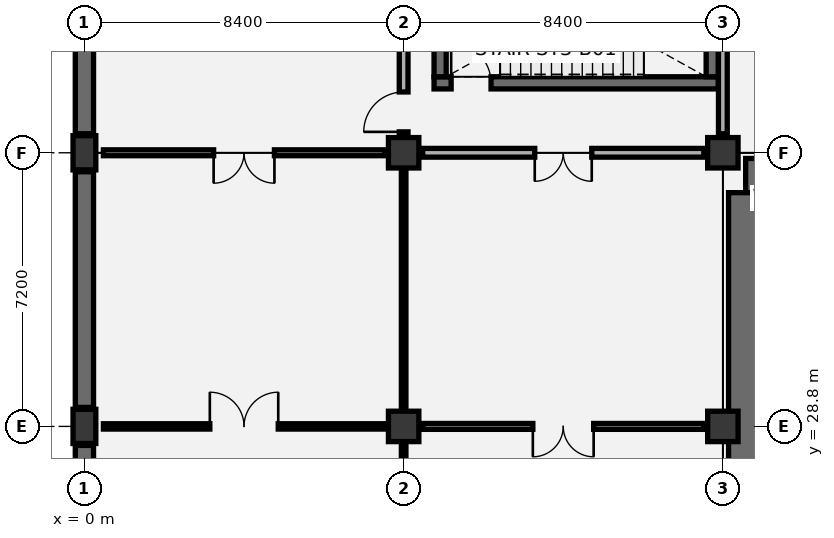
"""IFC4 building model, lengths in metres.
Left out: names, types, materials, properties, quantities, classifications, styles, units other than length and angle.
Written with IfcOpenShell. Run it as: python <this file> out.ifc"""

import sys

from ifc_helpers import new_model, si_unit, direction, frame, frame_2d, origin, origin_2d, place, context, subcontext, project, spatial, rectangle, extrude, element, fill, save


model = new_model("IFC4")
c1 = context("Model", 3, precision=1e-05, world=origin(), true_north=direction((0.0, 1.0)))
c2 = subcontext(c1, "Body", "Model", "MODEL_VIEW")
j1 = project(units=[si_unit("LENGTHUNIT", "METRE"), si_unit("PLANEANGLEUNIT", "RADIAN")], contexts=[c1])
p1 = place(None, origin())
s1 = spatial("IfcSite", under=j1, at=p1, CompositionType="ELEMENT")
p2 = place(p1, origin())
s2 = spatial("IfcBuilding", under=s1, at=p2, CompositionType="ELEMENT")
p3 = place(p2, frame((0.0, 0.0, -4.8)))
s3 = spatial("IfcBuildingStorey", under=s2, at=p3, CompositionType="ELEMENT", Elevation=-4.8)
for number, where, z_axis, x_axis in (
    (1, (0.0, 28.8, 0.0), (0.0, 0.0, 1.0), (1.0, 0.0, 0.0)),
    (2, (0.0, 36.0, 0.0), (0.0, 0.0, 1.0), (1.0, 0.0, 0.0)),
):
    element("IfcColumn", number, at=place(p3, frame(where, z_axis=z_axis, x_axis=x_axis)), inside=s3, PredefinedType="COLUMN", context=c2, shape_type="SweptSolid", body=[
        extrude(rectangle(XDim=0.6, YDim=0.9, at=origin_2d()), origin(), (0.0, 0.0, 1.0), 4.8),
    ])
for number, where, z_axis, x_axis in (
    (3, (8.4, 28.8, 0.0), (0.0, 0.0, 1.0), (1.0, 0.0, 0.0)),
    (4, (8.4, 36.0, 0.0), (0.0, 0.0, 1.0), (1.0, 0.0, 0.0)),
    (5, (16.8, 28.8, 0.0), (0.0, 0.0, 1.0), (1.0, 0.0, 0.0)),
    (6, (16.8, 36.0, 0.0), (0.0, 0.0, 1.0), (1.0, 0.0, 0.0)),
):
    element("IfcColumn", number, at=place(p3, frame(where, z_axis=z_axis, x_axis=x_axis)), inside=s3, PredefinedType="COLUMN", context=c2, shape_type="SweptSolid", body=[
        extrude(rectangle(XDim=0.8, YDim=0.8, at=origin_2d()), origin(), (0.0, 0.0, 1.0), 4.8),
    ])
for number, where, z_axis, x_axis in (
    (7, (0.0, 22.1, 0.0), (0.0, 0.0, 1.0), (0.0, 1.0, 0.0)),
    (8, (0.0, 29.3, 0.0), (0.0, 0.0, 1.0), (0.0, 1.0, 0.0)),
    (9, (0.0, 36.5, 0.0), (0.0, 0.0, 1.0), (0.0, 1.0, 0.0)),
):
    element("IfcWall", number, at=place(p3, frame(where, z_axis=z_axis, x_axis=x_axis)), inside=s3, PredefinedType="USERDEFINED", context=c2, shape_type="SweptSolid", body=[
        extrude(rectangle(XDim=6.2, YDim=0.48, at=frame_2d((3.1, 0.0))), origin(), (0.0, 0.0, 1.0), 4.45),
    ])
p4 = place(p3, frame((17.4, 35.4, 0.0), z_axis=(0.0, 0.0, 1.0), x_axis=(1.0, 0.0, 0.0)))
e10 = element("IfcWall", 10, at=p4, inside=s3, PredefinedType="SOLIDWALL", context=c2, shape_type="SweptSolid", body=[
    extrude(rectangle(XDim=24.0, YDim=0.9, at=frame_2d((12.0, 0.0))), origin(), (0.0, 0.0, 1.0), 4.8),
])
p5 = place(p4, frame((2.6, 0.0, 0.85)))
e11 = element("IfcOpeningElement", 11, at=p5, cuts=e10, PredefinedType="OPENING", context=c2, shape_type="SweptSolid", body=[
    extrude(rectangle(XDim=5.2, YDim=2.9, at=frame_2d((2.6, 1.45))), frame((0.0, 0.46, 0.0), z_axis=(0.0, -1.0, 0.0), x_axis=(1.0, 0.0, 0.0)), (0.0, 0.0, 1.0), 0.92),
])
p6 = place(p4, frame((14.8, 0.0, 0.85)))
e12 = element("IfcOpeningElement", 12, at=p6, cuts=e10, PredefinedType="OPENING", context=c2, shape_type="SweptSolid", body=[
    extrude(rectangle(XDim=5.2, YDim=2.9, at=frame_2d((2.6, 1.45))), frame((0.0, 0.46, 0.0), z_axis=(0.0, -1.0, 0.0), x_axis=(1.0, 0.0, 0.0)), (0.0, 0.0, 1.0), 0.92),
])
p7 = place(p3, frame((17.4, 22.65, 0.0), z_axis=(0.0, 0.0, 1.0), x_axis=(0.0, 1.0, 0.0)))
e13 = element("IfcWall", 13, at=p7, inside=s3, PredefinedType="SOLIDWALL", context=c2, shape_type="SweptSolid", body=[
    extrude(rectangle(XDim=12.3, YDim=0.9, at=frame_2d((6.15, 0.0))), origin(), (0.0, 0.0, 1.0), 4.8),
])
p8 = place(p7, frame((3.25, 0.0, 0.0)))
e14 = element("IfcOpeningElement", 14, at=p8, cuts=e13, PredefinedType="OPENING", context=c2, shape_type="SweptSolid", body=[
    extrude(rectangle(XDim=1.8, YDim=2.2, at=frame_2d((0.9, 1.1))), frame((0.0, 0.46, 0.0), z_axis=(0.0, -1.0, 0.0), x_axis=(1.0, 0.0, 0.0)), (0.0, 0.0, 1.0), 0.92),
])
p9 = place(p3, frame((9.2, 37.84, 0.0), z_axis=(0.0, 0.0, 1.0), x_axis=(1.0, 0.0, 0.0)))
e15 = element("IfcWall", 15, at=p9, inside=s3, PredefinedType="SHEAR", context=c2, shape_type="SweptSolid", body=[
    extrude(rectangle(XDim=7.48, YDim=0.32, at=frame_2d((3.74, 0.0))), origin(), (0.0, 0.0, 1.0), 4.45),
])
p10 = place(p9, frame((0.45, 0.0, 0.0)))
e16 = element("IfcOpeningElement", 16, at=p10, cuts=e15, PredefinedType="OPENING", context=c2, shape_type="SweptSolid", body=[
    extrude(rectangle(XDim=1.05, YDim=2.15, at=frame_2d((0.525, 1.075))), frame((0.0, 0.17, 0.0), z_axis=(0.0, -1.0, 0.0), x_axis=(1.0, 0.0, 0.0)), (0.0, 0.0, 1.0), 0.34),
])
for number, where, z_axis, x_axis in (
    (17, (9.36, 38.0, 0.0), (0.0, 0.0, 1.0), (0.0, 1.0, 0.0)),
    (18, (16.52, 38.0, 0.0), (0.0, 0.0, 1.0), (0.0, 1.0, 0.0)),
):
    element("IfcWall", number, at=place(p3, frame(where, z_axis=z_axis, x_axis=x_axis)), inside=s3, PredefinedType="SHEAR", context=c2, shape_type="SweptSolid", body=[
        extrude(rectangle(XDim=3.8, YDim=0.32, at=frame_2d((1.9, 0.0))), origin(), (0.0, 0.0, 1.0), 4.45),
    ])
p11 = place(p3, frame((8.4, 22.1, 0.0), z_axis=(0.0, 0.0, 1.0), x_axis=(0.0, 1.0, 0.0)))
e19 = element("IfcWall", 19, at=p11, inside=s3, PredefinedType="PARTITIONING", context=c2, shape_type="SweptSolid", body=[
    extrude(rectangle(XDim=6.2, YDim=0.12, at=frame_2d((3.1, 0.0))), origin(), (0.0, 0.0, 1.0), 3.645),
])
p12 = place(p3, frame((0.5, 28.8, 0.0), z_axis=(0.0, 0.0, 1.0), x_axis=(1.0, 0.0, 0.0)))
e20 = element("IfcWall", 20, at=p12, inside=s3, PredefinedType="PARTITIONING", context=c2, shape_type="SweptSolid", body=[
    extrude(rectangle(XDim=7.4, YDim=0.14, at=frame_2d((3.7, 0.0))), origin(), (0.0, 0.0, 1.0), 3.545),
])
p13 = place(p12, frame((2.8, 0.0, 0.0)))
e21 = element("IfcOpeningElement", 21, at=p13, cuts=e20, PredefinedType="OPENING", context=c2, shape_type="SweptSolid", body=[
    extrude(rectangle(XDim=1.8, YDim=2.25, at=frame_2d((0.9, 1.125))), frame((0.0, 0.08, 0.0), z_axis=(0.0, -1.0, 0.0), x_axis=(1.0, 0.0, 0.0)), (0.0, 0.0, 1.0), 0.16),
])
p14 = place(p3, frame((8.4, 29.3, 0.0), z_axis=(0.0, 0.0, 1.0), x_axis=(0.0, 1.0, 0.0)))
e22 = element("IfcWall", 22, at=p14, inside=s3, PredefinedType="PARTITIONING", context=c2, shape_type="SweptSolid", body=[
    extrude(rectangle(XDim=6.2, YDim=0.12, at=frame_2d((3.1, 0.0))), origin(), (0.0, 0.0, 1.0), 3.645),
])
p15 = place(p3, frame((0.5, 36.0, 0.0), z_axis=(0.0, 0.0, 1.0), x_axis=(1.0, 0.0, 0.0)))
e23 = element("IfcWall", 23, at=p15, inside=s3, PredefinedType="PARTITIONING", context=c2, shape_type="SweptSolid", body=[
    extrude(rectangle(XDim=7.4, YDim=0.155, at=frame_2d((3.7, 0.0))), origin(), (0.0, 0.0, 1.0), 3.545),
])
p16 = place(p15, frame((2.9, 0.0, 0.0)))
e24 = element("IfcOpeningElement", 24, at=p16, cuts=e23, PredefinedType="OPENING", context=c2, shape_type="SweptSolid", body=[
    extrude(rectangle(XDim=1.6, YDim=2.2, at=frame_2d((0.8, 1.1))), frame((0.0, 0.087, 0.0), z_axis=(0.0, -1.0, 0.0), x_axis=(1.0, 0.0, 0.0)), (0.0, 0.0, 1.0), 0.175),
])
p17 = place(p3, frame((8.4, 36.5, 0.0), z_axis=(0.0, 0.0, 1.0), x_axis=(0.0, 1.0, 0.0)))
e25 = element("IfcWall", 25, at=p17, inside=s3, PredefinedType="PARTITIONING", context=c2, shape_type="SweptSolid", body=[
    extrude(rectangle(XDim=6.2, YDim=0.23, at=frame_2d((3.1, 0.0))), origin(), (0.0, 0.0, 1.0), 3.645),
])
p18 = place(p17, frame((0.05, 0.0, 0.0)))
e26 = element("IfcOpeningElement", 26, at=p18, cuts=e25, PredefinedType="OPENING", context=c2, shape_type="SweptSolid", body=[
    extrude(rectangle(XDim=1.05, YDim=2.15, at=frame_2d((0.525, 1.075))), frame((0.0, 0.125, 0.0), z_axis=(0.0, -1.0, 0.0), x_axis=(1.0, 0.0, 0.0)), (0.0, 0.0, 1.0), 0.25),
])
p19 = place(p3, frame((8.9, 28.8, 0.0), z_axis=(0.0, 0.0, 1.0), x_axis=(1.0, 0.0, 0.0)))
e27 = element("IfcWall", 27, at=p19, inside=s3, PredefinedType="PARTITIONING", context=c2, shape_type="SweptSolid", body=[
    extrude(rectangle(XDim=7.4, YDim=0.155, at=frame_2d((3.7, 0.0))), origin(), (0.0, 0.0, 1.0), 3.545),
])
p20 = place(p19, frame((2.9, 0.0, 0.0)))
e28 = element("IfcOpeningElement", 28, at=p20, cuts=e27, PredefinedType="OPENING", context=c2, shape_type="SweptSolid", body=[
    extrude(rectangle(XDim=1.6, YDim=2.2, at=frame_2d((0.8, 1.1))), frame((0.0, 0.087, 0.0), z_axis=(0.0, -1.0, 0.0), x_axis=(1.0, 0.0, 0.0)), (0.0, 0.0, 1.0), 0.175),
])
p21 = place(p3, frame((8.9, 36.0, 0.0), z_axis=(0.0, 0.0, 1.0), x_axis=(1.0, 0.0, 0.0)))
e29 = element("IfcWall", 29, at=p21, inside=s3, PredefinedType="PARTITIONING", context=c2, shape_type="SweptSolid", body=[
    extrude(rectangle(XDim=7.4, YDim=0.23, at=frame_2d((3.7, 0.0))), origin(), (0.0, 0.0, 1.0), 3.545),
])
p22 = place(p21, frame((2.95, 0.0, 0.0)))
e30 = element("IfcOpeningElement", 30, at=p22, cuts=e29, PredefinedType="OPENING", context=c2, shape_type="SweptSolid", body=[
    extrude(rectangle(XDim=1.5, YDim=2.15, at=frame_2d((0.75, 1.075))), frame((0.0, 0.125, 0.0), z_axis=(0.0, -1.0, 0.0), x_axis=(1.0, 0.0, 0.0)), (0.0, 0.0, 1.0), 0.25),
])
p23 = place(p3, frame((16.8, 36.5, 0.0), z_axis=(0.0, 0.0, 1.0), x_axis=(0.0, 1.0, 0.0)))
e31 = element("IfcWall", 31, at=p23, inside=s3, PredefinedType="PARTITIONING", context=c2, shape_type="SweptSolid", body=[
    extrude(rectangle(XDim=6.2, YDim=0.23, at=frame_2d((3.1, 0.0))), origin(), (0.0, 0.0, 1.0), 3.645),
])
p24 = place(p10, origin())
e32 = element("IfcDoor", 32, at=p24, inside=s3, OperationType="SINGLE_SWING_LEFT", PredefinedType="DOOR", context=c2, shape_type="SweptSolid", body=[
    extrude(rectangle(XDim=1.05, YDim=2.15, at=frame_2d((0.525, 1.075))), frame((0.0, 0.025, 0.0), z_axis=(0.0, -1.0, 0.0), x_axis=(1.0, 0.0, 0.0)), (0.0, 0.0, 1.0), 0.05),
])
fill(e16, e32)
p25 = place(p13, origin())
e33 = element("IfcDoor", 33, at=p25, inside=s3, OperationType="DOUBLE_DOOR_SINGLE_SWING", PredefinedType="DOOR", context=c2, shape_type="SweptSolid", body=[
    extrude(rectangle(XDim=1.8, YDim=2.25, at=frame_2d((0.9, 1.125))), frame((0.0, 0.025, 0.0), z_axis=(0.0, -1.0, 0.0), x_axis=(1.0, 0.0, 0.0)), (0.0, 0.0, 1.0), 0.05),
])
fill(e21, e33)
p26 = place(p16, frame((1.6, 0.0, 0.0), z_axis=(0.0, 0.0, 1.0), x_axis=(-1.0, 0.0, 0.0)))
e34 = element("IfcDoor", 34, at=p26, inside=s3, OperationType="DOUBLE_DOOR_SINGLE_SWING", PredefinedType="DOOR", context=c2, shape_type="SweptSolid", body=[
    extrude(rectangle(XDim=1.6, YDim=2.2, at=frame_2d((0.8, 1.1))), frame((0.0, 0.025, 0.0), z_axis=(0.0, -1.0, 0.0), x_axis=(1.0, 0.0, 0.0)), (0.0, 0.0, 1.0), 0.05),
])
fill(e24, e34)
p27 = place(p18, origin())
e35 = element("IfcDoor", 35, at=p27, inside=s3, OperationType="SINGLE_SWING_LEFT", PredefinedType="DOOR", context=c2, shape_type="SweptSolid", body=[
    extrude(rectangle(XDim=1.05, YDim=2.15, at=frame_2d((0.525, 1.075))), frame((0.0, 0.025, 0.0), z_axis=(0.0, -1.0, 0.0), x_axis=(1.0, 0.0, 0.0)), (0.0, 0.0, 1.0), 0.05),
])
fill(e26, e35)
p28 = place(p20, frame((1.6, 0.0, 0.0), z_axis=(0.0, 0.0, 1.0), x_axis=(-1.0, 0.0, 0.0)))
e36 = element("IfcDoor", 36, at=p28, inside=s3, OperationType="DOUBLE_DOOR_SINGLE_SWING", PredefinedType="DOOR", context=c2, shape_type="SweptSolid", body=[
    extrude(rectangle(XDim=1.6, YDim=2.2, at=frame_2d((0.8, 1.1))), frame((0.0, 0.025, 0.0), z_axis=(0.0, -1.0, 0.0), x_axis=(1.0, 0.0, 0.0)), (0.0, 0.0, 1.0), 0.05),
])
fill(e28, e36)
p29 = place(p22, frame((1.5, 0.0, 0.0), z_axis=(0.0, 0.0, 1.0), x_axis=(-1.0, 0.0, 0.0)))
e37 = element("IfcDoor", 37, at=p29, inside=s3, OperationType="DOUBLE_DOOR_SINGLE_SWING", PredefinedType="DOOR", context=c2, shape_type="SweptSolid", body=[
    extrude(rectangle(XDim=1.5, YDim=2.15, at=frame_2d((0.75, 1.075))), frame((0.0, 0.025, 0.0), z_axis=(0.0, -1.0, 0.0), x_axis=(1.0, 0.0, 0.0)), (0.0, 0.0, 1.0), 0.05),
])
fill(e30, e37)
save(model, sys.argv[1])
